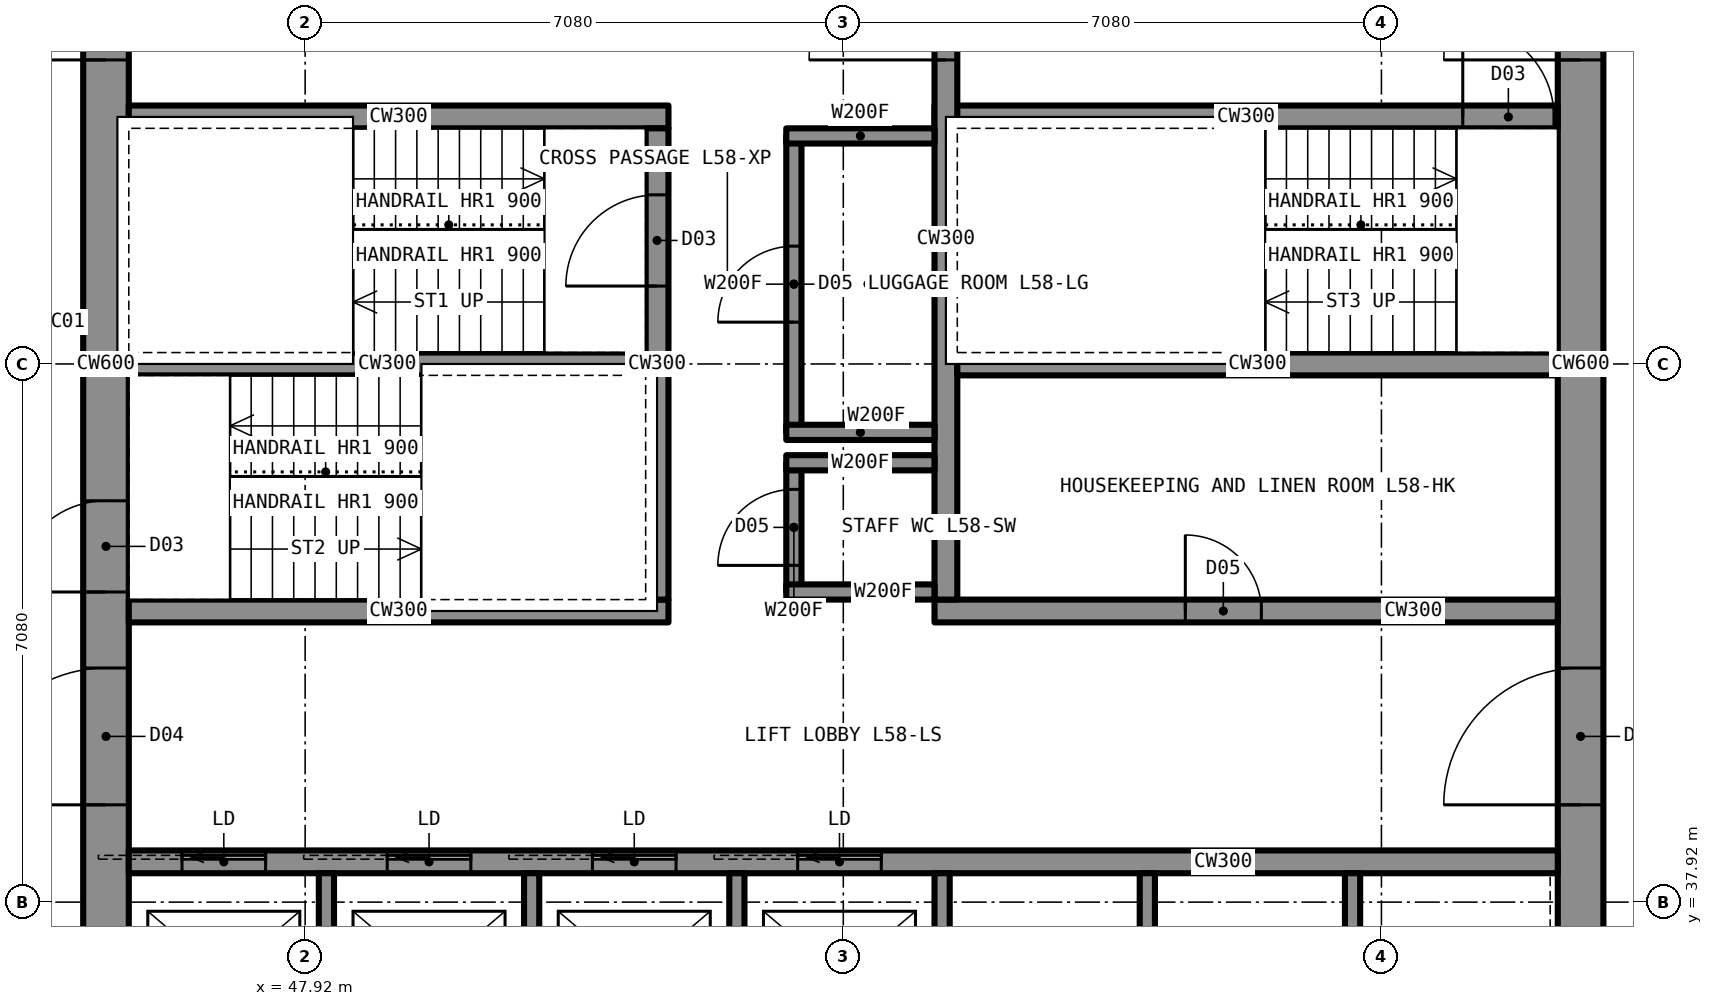
"""IFC4 building model, lengths in metres.
Left out: names, types, materials, properties, quantities, classifications, styles, units other than length and angle.
Written with IfcOpenShell. Run it as: python <this file> out.ifc"""

import sys

from ifc_helpers import new_model, si_unit, direction, frame, frame_2d, origin, place, context, subcontext, project, spatial, rectangle, extrude, element, fill, save


model = new_model("IFC4")
c1 = context("Model", 3, precision=1e-05, world=origin(), true_north=direction((0.0, 1.0)))
c2 = subcontext(c1, "Body", "Model", "MODEL_VIEW")
j1 = project(units=[si_unit("LENGTHUNIT", "METRE"), si_unit("PLANEANGLEUNIT", "RADIAN")], contexts=[c1])
p1 = place(None, origin())
s1 = spatial("IfcSite", under=j1, at=p1, CompositionType="ELEMENT")
p2 = place(p1, origin())
s2 = spatial("IfcBuilding", under=s1, at=p2, CompositionType="ELEMENT")
p3 = place(p2, frame((0.0, 0.0, 214.3)))
s3 = spatial("IfcBuildingStorey", under=s2, at=p3, CompositionType="ELEMENT", Elevation=214.3)
p4 = place(p3, frame((64.7, 35.6, 0.0), z_axis=(0.0, 0.0, 1.0), x_axis=(0.0, 1.0, 0.0)))
e1 = element("IfcWall", 1, at=p4, inside=s3, PredefinedType="SHEAR", context=c2, shape_type="SweptSolid", body=[
    extrude(rectangle(XDim=18.8, YDim=0.6, at=frame_2d((9.4, 0.0))), origin(), (0.0, 0.0, 1.0), 3.5),
])
p5 = place(p4, frame((13.4, 0.0, 0.0)))
e2 = element("IfcOpeningElement", 2, at=p5, cuts=e1, PredefinedType="OPENING", context=c2, shape_type="SweptSolid", body=[
    extrude(rectangle(XDim=1.8, YDim=2.2, at=frame_2d((0.9, 1.1))), frame((0.0, 0.31, 0.0), z_axis=(0.0, -1.0, 0.0), x_axis=(1.0, 0.0, 0.0)), (0.0, 0.0, 1.0), 0.62),
])
p6 = place(p4, frame((3.6, 0.0, 0.0)))
e3 = element("IfcOpeningElement", 3, at=p6, cuts=e1, PredefinedType="OPENING", context=c2, shape_type="SweptSolid", body=[
    extrude(rectangle(XDim=1.8, YDim=2.2, at=frame_2d((0.9, 1.1))), frame((0.0, 0.31, 0.0), z_axis=(0.0, -1.0, 0.0), x_axis=(1.0, 0.0, 0.0)), (0.0, 0.0, 1.0), 0.62),
])
p7 = place(p3, frame((45.3, 35.6, 0.0), z_axis=(0.0, 0.0, 1.0), x_axis=(0.0, 1.0, 0.0)))
e4 = element("IfcWall", 4, at=p7, inside=s3, PredefinedType="SHEAR", context=c2, shape_type="SweptSolid", body=[
    extrude(rectangle(XDim=18.8, YDim=0.6, at=frame_2d((9.4, 0.0))), origin(), (0.0, 0.0, 1.0), 3.5),
])
p8 = place(p7, frame((13.4, 0.0, 0.0)))
e5 = element("IfcOpeningElement", 5, at=p8, cuts=e4, PredefinedType="OPENING", context=c2, shape_type="SweptSolid", body=[
    extrude(rectangle(XDim=1.8, YDim=2.2, at=frame_2d((0.9, 1.1))), frame((0.0, 0.31, 0.0), z_axis=(0.0, -1.0, 0.0), x_axis=(1.0, 0.0, 0.0)), (0.0, 0.0, 1.0), 0.62),
])
p9 = place(p7, frame((3.6, 0.0, 0.0)))
e6 = element("IfcOpeningElement", 6, at=p9, cuts=e4, PredefinedType="OPENING", context=c2, shape_type="SweptSolid", body=[
    extrude(rectangle(XDim=1.8, YDim=2.2, at=frame_2d((0.9, 1.1))), frame((0.0, 0.31, 0.0), z_axis=(0.0, -1.0, 0.0), x_axis=(1.0, 0.0, 0.0)), (0.0, 0.0, 1.0), 0.62),
])
p10 = place(p7, frame((6.4, 0.0, 0.0)))
e7 = element("IfcOpeningElement", 7, at=p10, cuts=e4, PredefinedType="OPENING", context=c2, shape_type="SweptSolid", body=[
    extrude(rectangle(XDim=1.2, YDim=2.2, at=frame_2d((0.6, 1.1))), frame((0.0, 0.31, 0.0), z_axis=(0.0, -1.0, 0.0), x_axis=(1.0, 0.0, 0.0)), (0.0, 0.0, 1.0), 0.62),
])
p11 = place(p3, frame((45.6, 38.45, 0.0), z_axis=(0.0, 0.0, 1.0), x_axis=(1.0, 0.0, 0.0)))
e8 = element("IfcWall", 8, at=p11, inside=s3, PredefinedType="SHEAR", context=c2, shape_type="SweptSolid", body=[
    extrude(rectangle(XDim=18.8, YDim=0.3, at=frame_2d((9.4, 0.0))), origin(), (0.0, 0.0, 1.0), 3.5),
])
p12 = place(p11, frame((0.7, 0.0, 0.0)))
e9 = element("IfcOpeningElement", 9, at=p12, cuts=e8, PredefinedType="OPENING", context=c2, shape_type="SweptSolid", body=[
    extrude(rectangle(XDim=1.1, YDim=2.2, at=frame_2d((0.55, 1.1))), frame((0.0, 0.16, 0.0), z_axis=(0.0, -1.0, 0.0), x_axis=(1.0, 0.0, 0.0)), (0.0, 0.0, 1.0), 0.32),
])
p13 = place(p11, frame((3.4, 0.0, 0.0)))
e10 = element("IfcOpeningElement", 10, at=p13, cuts=e8, PredefinedType="OPENING", context=c2, shape_type="SweptSolid", body=[
    extrude(rectangle(XDim=1.1, YDim=2.2, at=frame_2d((0.55, 1.1))), frame((0.0, 0.16, 0.0), z_axis=(0.0, -1.0, 0.0), x_axis=(1.0, 0.0, 0.0)), (0.0, 0.0, 1.0), 0.32),
])
p14 = place(p11, frame((6.1, 0.0, 0.0)))
e11 = element("IfcOpeningElement", 11, at=p14, cuts=e8, PredefinedType="OPENING", context=c2, shape_type="SweptSolid", body=[
    extrude(rectangle(XDim=1.1, YDim=2.2, at=frame_2d((0.55, 1.1))), frame((0.0, 0.16, 0.0), z_axis=(0.0, -1.0, 0.0), x_axis=(1.0, 0.0, 0.0)), (0.0, 0.0, 1.0), 0.32),
])
p15 = place(p11, frame((8.8, 0.0, 0.0)))
e12 = element("IfcOpeningElement", 12, at=p15, cuts=e8, PredefinedType="OPENING", context=c2, shape_type="SweptSolid", body=[
    extrude(rectangle(XDim=1.1, YDim=2.2, at=frame_2d((0.55, 1.1))), frame((0.0, 0.16, 0.0), z_axis=(0.0, -1.0, 0.0), x_axis=(1.0, 0.0, 0.0)), (0.0, 0.0, 1.0), 0.32),
])
p16 = place(p3, frame((45.6, 48.25, 0.0), z_axis=(0.0, 0.0, 1.0), x_axis=(1.0, 0.0, 0.0)))
e13 = element("IfcWall", 13, at=p16, inside=s3, PredefinedType="SHEAR", context=c2, shape_type="SweptSolid", body=[
    extrude(rectangle(XDim=7.1, YDim=0.3, at=frame_2d((3.55, 0.0))), origin(), (0.0, 0.0, 1.0), 3.5),
])
p17 = place(p3, frame((56.2, 48.25, 0.0), z_axis=(0.0, 0.0, 1.0), x_axis=(1.0, 0.0, 0.0)))
e14 = element("IfcWall", 14, at=p17, inside=s3, PredefinedType="SHEAR", context=c2, shape_type="SweptSolid", body=[
    extrude(rectangle(XDim=8.2, YDim=0.3, at=frame_2d((4.1, 0.0))), origin(), (0.0, 0.0, 1.0), 3.5),
])
p18 = place(p17, frame((6.95, 0.0, 0.0)))
e15 = element("IfcOpeningElement", 15, at=p18, cuts=e14, PredefinedType="OPENING", context=c2, shape_type="SweptSolid", body=[
    extrude(rectangle(XDim=1.2, YDim=2.2, at=frame_2d((0.6, 1.1))), frame((0.0, 0.16, 0.0), z_axis=(0.0, -1.0, 0.0), x_axis=(1.0, 0.0, 0.0)), (0.0, 0.0, 1.0), 0.32),
])
p19 = place(p3, frame((45.6, 41.75, 0.0), z_axis=(0.0, 0.0, 1.0), x_axis=(1.0, 0.0, 0.0)))
e16 = element("IfcWall", 16, at=p19, inside=s3, PredefinedType="SHEAR", context=c2, shape_type="SweptSolid", body=[
    extrude(rectangle(XDim=7.1, YDim=0.3, at=frame_2d((3.55, 0.0))), origin(), (0.0, 0.0, 1.0), 3.5),
])
p20 = place(p3, frame((56.2, 41.75, 0.0), z_axis=(0.0, 0.0, 1.0), x_axis=(1.0, 0.0, 0.0)))
e17 = element("IfcWall", 17, at=p20, inside=s3, PredefinedType="SHEAR", context=c2, shape_type="SweptSolid", body=[
    extrude(rectangle(XDim=8.2, YDim=0.3, at=frame_2d((4.1, 0.0))), origin(), (0.0, 0.0, 1.0), 3.5),
])
p21 = place(p20, frame((3.3, 0.0, 0.0)))
e18 = element("IfcOpeningElement", 18, at=p21, cuts=e17, PredefinedType="OPENING", context=c2, shape_type="SweptSolid", body=[
    extrude(rectangle(XDim=1.0, YDim=2.1, at=frame_2d((0.5, 1.05))), frame((0.0, 0.16, 0.0), z_axis=(0.0, -1.0, 0.0), x_axis=(1.0, 0.0, 0.0)), (0.0, 0.0, 1.0), 0.32),
])
p22 = place(p3, frame((52.55, 41.9, 0.0), z_axis=(0.0, 0.0, 1.0), x_axis=(0.0, 1.0, 0.0)))
e19 = element("IfcWall", 19, at=p22, inside=s3, PredefinedType="SHEAR", context=c2, shape_type="SweptSolid", body=[
    extrude(rectangle(XDim=6.2, YDim=0.3, at=frame_2d((3.1, 0.0))), origin(), (0.0, 0.0, 1.0), 3.5),
])
p23 = place(p22, frame((4.125, 0.0, 0.0)))
e20 = element("IfcOpeningElement", 20, at=p23, cuts=e19, PredefinedType="OPENING", context=c2, shape_type="SweptSolid", body=[
    extrude(rectangle(XDim=1.2, YDim=2.2, at=frame_2d((0.6, 1.1))), frame((0.0, 0.16, 0.0), z_axis=(0.0, -1.0, 0.0), x_axis=(1.0, 0.0, 0.0)), (0.0, 0.0, 1.0), 0.32),
])
p24 = place(p3, frame((56.35, 41.9, 0.0), z_axis=(0.0, 0.0, 1.0), x_axis=(0.0, 1.0, 0.0)))
e21 = element("IfcWall", 21, at=p24, inside=s3, PredefinedType="SHEAR", context=c2, shape_type="SweptSolid", body=[
    extrude(rectangle(XDim=9.5, YDim=0.3, at=frame_2d((4.75, 0.0))), origin(), (0.0, 0.0, 1.0), 3.5),
])
p25 = place(p24, frame((7.1, 0.0, 0.0)))
e22 = element("IfcOpeningElement", 22, at=p25, cuts=e21, PredefinedType="OPENING", context=c2, shape_type="SweptSolid", body=[
    extrude(rectangle(XDim=1.8, YDim=2.2, at=frame_2d((0.9, 1.1))), frame((0.0, 0.16, 0.0), z_axis=(0.0, -1.0, 0.0), x_axis=(1.0, 0.0, 0.0)), (0.0, 0.0, 1.0), 0.32),
])
p26 = place(p3, frame((45.6, 45.0, 0.0), z_axis=(0.0, 0.0, 1.0), x_axis=(1.0, 0.0, 0.0)))
e23 = element("IfcWall", 23, at=p26, inside=s3, PredefinedType="SHEAR", context=c2, shape_type="SweptSolid", body=[
    extrude(rectangle(XDim=6.8, YDim=0.3, at=frame_2d((3.4, 0.0))), origin(), (0.0, 0.0, 1.0), 3.5),
])
p27 = place(p3, frame((56.5, 45.0, 0.0), z_axis=(0.0, 0.0, 1.0), x_axis=(1.0, 0.0, 0.0)))
e24 = element("IfcWall", 24, at=p27, inside=s3, PredefinedType="SHEAR", context=c2, shape_type="SweptSolid", body=[
    extrude(rectangle(XDim=7.9, YDim=0.3, at=frame_2d((3.95, 0.0))), origin(), (0.0, 0.0, 1.0), 3.5),
])
p28 = place(p3, frame((54.35, 42.0, 0.0), z_axis=(0.0, 0.0, 1.0), x_axis=(0.0, 1.0, 0.0)))
e25 = element("IfcWall", 25, at=p28, inside=s3, PredefinedType="PARTITIONING", context=c2, shape_type="SweptSolid", body=[
    extrude(rectangle(XDim=1.7, YDim=0.2, at=frame_2d((0.85, 0.0))), origin(), (0.0, 0.0, 1.0), 3.33),
])
p29 = place(p28, frame((0.35, 0.0, 0.0)))
e26 = element("IfcOpeningElement", 26, at=p29, cuts=e25, PredefinedType="OPENING", context=c2, shape_type="SweptSolid", body=[
    extrude(rectangle(XDim=1.0, YDim=2.1, at=frame_2d((0.5, 1.05))), frame((0.0, 0.11, 0.0), z_axis=(0.0, -1.0, 0.0), x_axis=(1.0, 0.0, 0.0)), (0.0, 0.0, 1.0), 0.22),
])
for number, where, z_axis, x_axis in (
    (27, (54.25, 42.0, 0.0), (0.0, 0.0, 1.0), (1.0, 0.0, 0.0)),
    (28, (54.25, 43.7, 0.0), (0.0, 0.0, 1.0), (1.0, 0.0, 0.0)),
):
    element("IfcWall", number, at=place(p3, frame(where, z_axis=z_axis, x_axis=x_axis)), inside=s3, PredefinedType="PARTITIONING", context=c2, shape_type="SweptSolid", body=[
        extrude(rectangle(XDim=1.95, YDim=0.2, at=frame_2d((0.975, 0.0))), origin(), (0.0, 0.0, 1.0), 3.33),
    ])
p30 = place(p3, frame((54.35, 44.1, 0.0), z_axis=(0.0, 0.0, 1.0), x_axis=(0.0, 1.0, 0.0)))
e29 = element("IfcWall", 29, at=p30, inside=s3, PredefinedType="PARTITIONING", context=c2, shape_type="SweptSolid", body=[
    extrude(rectangle(XDim=3.9, YDim=0.2, at=frame_2d((1.95, 0.0))), origin(), (0.0, 0.0, 1.0), 3.33),
])
p31 = place(p30, frame((1.45, 0.0, 0.0)))
e30 = element("IfcOpeningElement", 30, at=p31, cuts=e29, PredefinedType="OPENING", context=c2, shape_type="SweptSolid", body=[
    extrude(rectangle(XDim=1.0, YDim=2.1, at=frame_2d((0.5, 1.05))), frame((0.0, 0.11, 0.0), z_axis=(0.0, -1.0, 0.0), x_axis=(1.0, 0.0, 0.0)), (0.0, 0.0, 1.0), 0.22),
])
for number, where, z_axis, x_axis in (
    (31, (54.25, 44.1, 0.0), (0.0, 0.0, 1.0), (1.0, 0.0, 0.0)),
    (32, (54.25, 48.0, 0.0), (0.0, 0.0, 1.0), (1.0, 0.0, 0.0)),
):
    element("IfcWall", number, at=place(p3, frame(where, z_axis=z_axis, x_axis=x_axis)), inside=s3, PredefinedType="PARTITIONING", context=c2, shape_type="SweptSolid", body=[
        extrude(rectangle(XDim=1.95, YDim=0.2, at=frame_2d((0.975, 0.0))), origin(), (0.0, 0.0, 1.0), 3.33),
    ])
for number, where, z_axis, x_axis in (
    (33, (48.2, 35.6, 0.0), (0.0, 0.0, 1.0), (0.0, 1.0, 0.0)),
    (34, (50.9, 35.6, 0.0), (0.0, 0.0, 1.0), (0.0, 1.0, 0.0)),
    (35, (53.6, 35.6, 0.0), (0.0, 0.0, 1.0), (0.0, 1.0, 0.0)),
    (36, (56.3, 35.6, 0.0), (0.0, 0.0, 1.0), (0.0, 1.0, 0.0)),
    (37, (59.0, 35.6, 0.0), (0.0, 0.0, 1.0), (0.0, 1.0, 0.0)),
    (38, (61.7, 35.6, 0.0), (0.0, 0.0, 1.0), (0.0, 1.0, 0.0)),
):
    element("IfcWall", number, at=place(p3, frame(where, z_axis=z_axis, x_axis=x_axis)), inside=s3, PredefinedType="PARTITIONING", context=c2, shape_type="SweptSolid", body=[
        extrude(rectangle(XDim=2.7, YDim=0.2, at=frame_2d((1.35, 0.0))), origin(), (0.0, 0.0, 1.0), 3.33),
    ])
p32 = place(p29, origin())
e39 = element("IfcDoor", 39, at=p32, inside=s3, OperationType="SINGLE_SWING_LEFT", PredefinedType="DOOR", context=c2, shape_type="SweptSolid", body=[
    extrude(rectangle(XDim=1.0, YDim=2.1, at=frame_2d((0.5, 1.05))), frame((0.0, 0.025, 0.0), z_axis=(0.0, -1.0, 0.0), x_axis=(1.0, 0.0, 0.0)), (0.0, 0.0, 1.0), 0.05),
])
fill(e26, e39)
p33 = place(p31, origin())
e40 = element("IfcDoor", 40, at=p33, inside=s3, OperationType="SINGLE_SWING_LEFT", PredefinedType="DOOR", context=c2, shape_type="SweptSolid", body=[
    extrude(rectangle(XDim=1.0, YDim=2.1, at=frame_2d((0.5, 1.05))), frame((0.0, 0.025, 0.0), z_axis=(0.0, -1.0, 0.0), x_axis=(1.0, 0.0, 0.0)), (0.0, 0.0, 1.0), 0.05),
])
fill(e30, e40)
p34 = place(p8, origin())
e41 = element("IfcDoor", 41, at=p34, inside=s3, OperationType="DOUBLE_DOOR_SINGLE_SWING", PredefinedType="DOOR", context=c2, shape_type="SweptSolid", body=[
    extrude(rectangle(XDim=1.8, YDim=2.2, at=frame_2d((0.9, 1.1))), frame((0.0, 0.025, 0.0), z_axis=(0.0, -1.0, 0.0), x_axis=(1.0, 0.0, 0.0)), (0.0, 0.0, 1.0), 0.05),
])
fill(e5, e41)
p35 = place(p9, origin())
e42 = element("IfcDoor", 42, at=p35, inside=s3, OperationType="DOUBLE_DOOR_SINGLE_SWING", PredefinedType="DOOR", context=c2, shape_type="SweptSolid", body=[
    extrude(rectangle(XDim=1.8, YDim=2.2, at=frame_2d((0.9, 1.1))), frame((0.0, 0.025, 0.0), z_axis=(0.0, -1.0, 0.0), x_axis=(1.0, 0.0, 0.0)), (0.0, 0.0, 1.0), 0.05),
])
fill(e6, e42)
p36 = place(p5, origin())
e43 = element("IfcDoor", 43, at=p36, inside=s3, OperationType="DOUBLE_DOOR_SINGLE_SWING", PredefinedType="DOOR", context=c2, shape_type="SweptSolid", body=[
    extrude(rectangle(XDim=1.8, YDim=2.2, at=frame_2d((0.9, 1.1))), frame((0.0, 0.025, 0.0), z_axis=(0.0, -1.0, 0.0), x_axis=(1.0, 0.0, 0.0)), (0.0, 0.0, 1.0), 0.05),
])
fill(e2, e43)
p37 = place(p6, origin())
e44 = element("IfcDoor", 44, at=p37, inside=s3, OperationType="DOUBLE_DOOR_SINGLE_SWING", PredefinedType="DOOR", context=c2, shape_type="SweptSolid", body=[
    extrude(rectangle(XDim=1.8, YDim=2.2, at=frame_2d((0.9, 1.1))), frame((0.0, 0.025, 0.0), z_axis=(0.0, -1.0, 0.0), x_axis=(1.0, 0.0, 0.0)), (0.0, 0.0, 1.0), 0.05),
])
fill(e3, e44)
p38 = place(p25, origin())
e45 = element("IfcDoor", 45, at=p38, inside=s3, OperationType="DOUBLE_DOOR_SINGLE_SWING", PredefinedType="DOOR", context=c2, shape_type="SweptSolid", body=[
    extrude(rectangle(XDim=1.8, YDim=2.2, at=frame_2d((0.9, 1.1))), frame((0.0, 0.025, 0.0), z_axis=(0.0, -1.0, 0.0), x_axis=(1.0, 0.0, 0.0)), (0.0, 0.0, 1.0), 0.05),
])
fill(e22, e45)
p39 = place(p23, origin())
e46 = element("IfcDoor", 46, at=p39, inside=s3, OperationType="SINGLE_SWING_LEFT", PredefinedType="DOOR", context=c2, shape_type="SweptSolid", body=[
    extrude(rectangle(XDim=1.2, YDim=2.2, at=frame_2d((0.6, 1.1))), frame((0.0, 0.025, 0.0), z_axis=(0.0, -1.0, 0.0), x_axis=(1.0, 0.0, 0.0)), (0.0, 0.0, 1.0), 0.05),
])
fill(e20, e46)
p40 = place(p10, origin())
e47 = element("IfcDoor", 47, at=p40, inside=s3, OperationType="SINGLE_SWING_LEFT", PredefinedType="DOOR", context=c2, shape_type="SweptSolid", body=[
    extrude(rectangle(XDim=1.2, YDim=2.2, at=frame_2d((0.6, 1.1))), frame((0.0, 0.025, 0.0), z_axis=(0.0, -1.0, 0.0), x_axis=(1.0, 0.0, 0.0)), (0.0, 0.0, 1.0), 0.05),
])
fill(e7, e47)
p41 = place(p18, origin())
e48 = element("IfcDoor", 48, at=p41, inside=s3, OperationType="SINGLE_SWING_LEFT", PredefinedType="DOOR", context=c2, shape_type="SweptSolid", body=[
    extrude(rectangle(XDim=1.2, YDim=2.2, at=frame_2d((0.6, 1.1))), frame((0.0, 0.025, 0.0), z_axis=(0.0, -1.0, 0.0), x_axis=(1.0, 0.0, 0.0)), (0.0, 0.0, 1.0), 0.05),
])
fill(e15, e48)
p42 = place(p21, origin())
e49 = element("IfcDoor", 49, at=p42, inside=s3, OperationType="SINGLE_SWING_LEFT", PredefinedType="DOOR", context=c2, shape_type="SweptSolid", body=[
    extrude(rectangle(XDim=1.0, YDim=2.1, at=frame_2d((0.5, 1.05))), frame((0.0, 0.025, 0.0), z_axis=(0.0, -1.0, 0.0), x_axis=(1.0, 0.0, 0.0)), (0.0, 0.0, 1.0), 0.05),
])
fill(e18, e49)
p43 = place(p12, origin())
e50 = element("IfcDoor", 50, at=p43, inside=s3, OperationType="SLIDING_TO_LEFT", PredefinedType="DOOR", context=c2, shape_type="SweptSolid", body=[
    extrude(rectangle(XDim=1.1, YDim=2.2, at=frame_2d((0.55, 1.1))), frame((0.0, 0.025, 0.0), z_axis=(0.0, -1.0, 0.0), x_axis=(1.0, 0.0, 0.0)), (0.0, 0.0, 1.0), 0.05),
])
fill(e9, e50)
p44 = place(p13, origin())
e51 = element("IfcDoor", 51, at=p44, inside=s3, OperationType="SLIDING_TO_LEFT", PredefinedType="DOOR", context=c2, shape_type="SweptSolid", body=[
    extrude(rectangle(XDim=1.1, YDim=2.2, at=frame_2d((0.55, 1.1))), frame((0.0, 0.025, 0.0), z_axis=(0.0, -1.0, 0.0), x_axis=(1.0, 0.0, 0.0)), (0.0, 0.0, 1.0), 0.05),
])
fill(e10, e51)
p45 = place(p14, origin())
e52 = element("IfcDoor", 52, at=p45, inside=s3, OperationType="SLIDING_TO_LEFT", PredefinedType="DOOR", context=c2, shape_type="SweptSolid", body=[
    extrude(rectangle(XDim=1.1, YDim=2.2, at=frame_2d((0.55, 1.1))), frame((0.0, 0.025, 0.0), z_axis=(0.0, -1.0, 0.0), x_axis=(1.0, 0.0, 0.0)), (0.0, 0.0, 1.0), 0.05),
])
fill(e11, e52)
p46 = place(p15, origin())
e53 = element("IfcDoor", 53, at=p46, inside=s3, OperationType="SLIDING_TO_LEFT", PredefinedType="DOOR", context=c2, shape_type="SweptSolid", body=[
    extrude(rectangle(XDim=1.1, YDim=2.2, at=frame_2d((0.55, 1.1))), frame((0.0, 0.025, 0.0), z_axis=(0.0, -1.0, 0.0), x_axis=(1.0, 0.0, 0.0)), (0.0, 0.0, 1.0), 0.05),
])
fill(e12, e53)
save(model, sys.argv[1])
